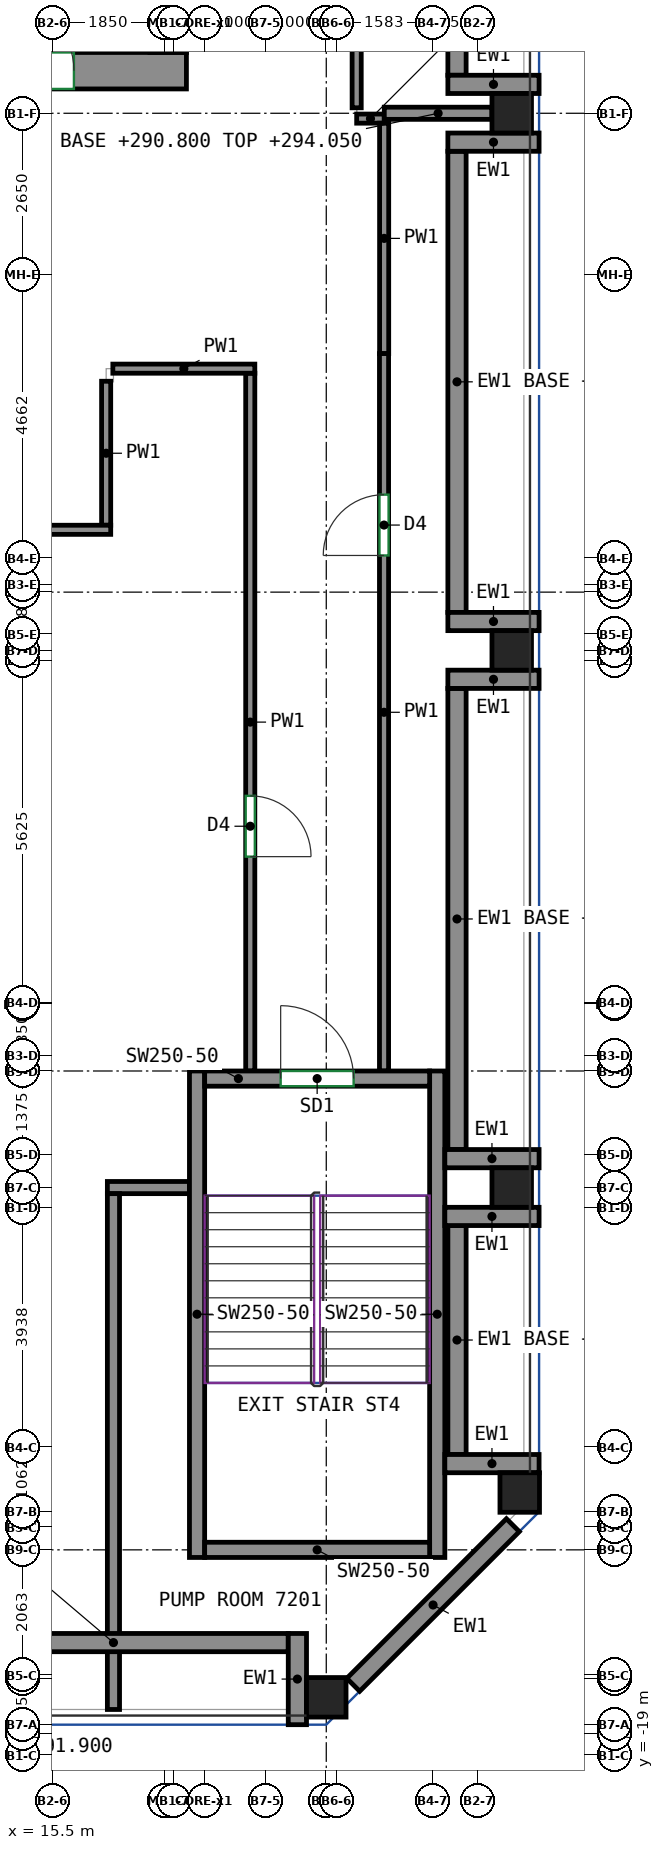
"""IFC4 building model, lengths in metres.
Left out: names, types, materials, properties, quantities, classifications, styles, units other than length and angle.
Written with IfcOpenShell. Run it as: python <this file> out.ifc"""

import sys

from ifc_helpers import new_model, si_unit, direction, frame, frame_2d, origin, origin_2d, place, context, subcontext, project, spatial, rectangle, extrude, source, transform, mapped, element, fill, save


model = new_model("IFC4")
c1 = context("Model", 3, precision=1e-05, world=origin(), true_north=direction((0.0, 1.0)))
c2 = subcontext(c1, "Body", "Model", "MODEL_VIEW")
j1 = project(units=[si_unit("LENGTHUNIT", "METRE"), si_unit("PLANEANGLEUNIT", "RADIAN")], contexts=[c1])
p1 = place(None, origin())
s1 = spatial("IfcSite", under=j1, at=p1, CompositionType="ELEMENT")
p2 = place(p1, origin())
s2 = spatial("IfcBuilding", under=s1, at=p2, CompositionType="ELEMENT")
p3 = place(p2, frame((0.0, 0.0, 290.8)))
s3 = spatial("IfcBuildingStorey", under=s2, at=p3, CompositionType="ELEMENT", Elevation=290.8)
m1 = source(origin(), c2, "Body", "SweptSolid", [
    extrude(rectangle(XDim=0.65, YDim=0.65, at=origin_2d()), origin(), (0.0, 0.0, 1.0), 2.3),
])
for number, where, z_axis, x_axis in (
    (1, (20.0, -18.05, 0.0), (0.0, 0.0, 1.0), (1.0, 0.0, 0.0)),
    (2, (23.05, -9.667, 0.0), (0.0, 0.0, 1.0), (1.0, 0.0, 0.0)),
    (3, (23.05, -0.833, 0.0), (0.0, 0.0, 1.0), (1.0, 0.0, 0.0)),
    (4, (23.05, 8.0, 0.0), (0.0, 0.0, 1.0), (1.0, 0.0, 0.0)),
    (5, (23.182, -14.682, 0.0), (0.0, 0.0, 1.0), (1.0, 0.0, 0.0)),
):
    element("IfcColumn", number, at=place(p3, frame(where, z_axis=z_axis, x_axis=x_axis)), inside=s3, PredefinedType="COLUMN", context=c2, shape_type="MappedRepresentation", body=[
        mapped(m1, transform((0.0, 0.0, 0.0))),
    ])
m2 = source(origin(), c2, "Body", "SweptSolid", [
    extrude(rectangle(XDim=5.23, YDim=0.6, at=frame_2d((2.615, 0.0))), origin(), (0.0, 0.0, 1.0), 3.8),
])
p4 = place(p3, frame((12.47, 8.7, 0.0), z_axis=(0.0, 0.0, 1.0), x_axis=(1.0, 0.0, 0.0)))
e6 = element("IfcWall", 6, at=p4, inside=s3, PredefinedType="SHEAR", context=c2, shape_type="MappedRepresentation", body=[
    mapped(m2, transform((0.0, 0.0, 0.0))),
])
p5 = place(p4, frame((2.18, 0.0, 0.0)))
e7 = element("IfcOpeningElement", 7, at=p5, cuts=e6, PredefinedType="OPENING", context=c2, shape_type="SweptSolid", body=[
    extrude(rectangle(XDim=1.2, YDim=2.1, at=frame_2d((0.6, 1.05))), frame((0.0, 0.31, 0.0), z_axis=(0.0, -1.0, 0.0), x_axis=(1.0, 0.0, 0.0)), (0.0, 0.0, 1.0), 0.62),
])
m3 = source(origin(), c2, "Body", "SweptSolid", [
    extrude(rectangle(XDim=8.0, YDim=0.25, at=frame_2d((4.0, 0.0))), origin(), (0.0, 0.0, 1.0), 3.8),
])
for number, where, z_axis, x_axis in (
    (8, (17.875, -15.75, 0.0), (0.0, 0.0, 1.0), (0.0, 1.0, 0.0)),
    (9, (21.825, -15.75, 0.0), (0.0, 0.0, 1.0), (0.0, 1.0, 0.0)),
):
    element("IfcWall", number, at=place(p3, frame(where, z_axis=z_axis, x_axis=x_axis)), inside=s3, PredefinedType="SHEAR", context=c2, shape_type="MappedRepresentation", body=[
        mapped(m3, transform((0.0, 0.0, 0.0))),
    ])
m4 = source(origin(), c2, "Body", "SweptSolid", [
    extrude(rectangle(XDim=3.7, YDim=0.25, at=frame_2d((1.85, 0.0))), origin(), (0.0, 0.0, 1.0), 3.8),
])
p6 = place(p3, frame((18.0, -15.625, 0.0), z_axis=(0.0, 0.0, 1.0), x_axis=(1.0, 0.0, 0.0)))
e10 = element("IfcWall", 10, at=p6, inside=s3, PredefinedType="SHEAR", context=c2, shape_type="MappedRepresentation", body=[
    mapped(m4, transform((0.0, 0.0, 0.0))),
])
p7 = place(p3, frame((18.0, -7.875, 0.0), z_axis=(0.0, 0.0, 1.0), x_axis=(1.0, 0.0, 0.0)))
e11 = element("IfcWall", 11, at=p7, inside=s3, PredefinedType="SHEAR", context=c2, shape_type="MappedRepresentation", body=[
    mapped(m4, transform((0.0, 0.0, 0.0))),
])
p8 = place(p7, frame((1.25, 0.0, 0.0)))
e12 = element("IfcOpeningElement", 12, at=p8, cuts=e11, PredefinedType="OPENING", context=c2, shape_type="SweptSolid", body=[
    extrude(rectangle(XDim=1.2, YDim=2.1, at=frame_2d((0.6, 1.05))), frame((0.0, 0.135, 0.0), z_axis=(0.0, -1.0, 0.0), x_axis=(1.0, 0.0, 0.0)), (0.0, 0.0, 1.0), 0.27),
])
m5 = source(origin(), c2, "Body", "SweptSolid", [
    extrude(rectangle(XDim=5.75, YDim=0.3, at=frame_2d((2.875, 0.0))), origin(), (0.0, 0.0, 1.0), 1.1),
])
p9 = place(p3, frame((13.625, -17.15, 0.0), z_axis=(0.0, 0.0, 1.0), x_axis=(1.0, 0.0, 0.0)))
e13 = element("IfcWall", 13, at=p9, inside=s3, PredefinedType="SOLIDWALL", context=c2, shape_type="MappedRepresentation", body=[
    mapped(m5, transform((0.0, 0.0, 0.0))),
])
m6 = source(origin(), c2, "Body", "SweptSolid", [
    extrude(rectangle(XDim=1.5, YDim=0.3, at=frame_2d((0.75, 0.0))), origin(), (0.0, 0.0, 1.0), 2.3),
])
p10 = place(p3, frame((19.525, -18.5, 0.0), z_axis=(0.0, 0.0, 1.0), x_axis=(0.0, 1.0, 0.0)))
e14 = element("IfcWall", 14, at=p10, inside=s3, PredefinedType="SOLIDWALL", context=c2, shape_type="MappedRepresentation", body=[
    mapped(m6, transform((0.0, 0.0, 0.0))),
])
m7 = source(origin(), c2, "Body", "SweptSolid", [
    extrude(rectangle(XDim=3.712, YDim=0.3, at=frame_2d((1.856, 0.0))), origin(), (0.0, 0.0, 1.0), 2.3),
])
p11 = place(p3, frame((20.444, -17.844, 0.0), z_axis=(0.0, 0.0, 1.0), x_axis=(0.707106781187, 0.707106781187, 0.0)))
e15 = element("IfcWall", 15, at=p11, inside=s3, PredefinedType="SOLIDWALL", context=c2, shape_type="MappedRepresentation", body=[
    mapped(m7, transform((0.0, 0.0, 0.0))),
])
m8 = source(origin(), c2, "Body", "SweptSolid", [
    extrude(rectangle(XDim=3.765, YDim=0.3, at=frame_2d((1.883, 0.0))), origin(), (0.0, 0.0, 1.0), 1.1),
])
p12 = place(p3, frame((22.15, -14.057, 0.0), z_axis=(0.0, 0.0, 1.0), x_axis=(0.0, 1.0, 0.0)))
e16 = element("IfcWall", 16, at=p12, inside=s3, PredefinedType="SOLIDWALL", context=c2, shape_type="MappedRepresentation", body=[
    mapped(m8, transform((0.0, 0.0, 0.0))),
])
m9 = source(origin(), c2, "Body", "SweptSolid", [
    extrude(rectangle(XDim=1.55, YDim=0.3, at=frame_2d((0.775, 0.0))), origin(), (0.0, 0.0, 1.0), 2.3),
])
for number, where, z_axis, x_axis in (
    (17, (23.5, -14.207, 0.0), (0.0, 0.0, 1.0), (-1.0, 0.0, 0.0)),
    (18, (23.5, -10.142, 0.0), (0.0, 0.0, 1.0), (-1.0, 0.0, 0.0)),
):
    element("IfcWall", number, at=place(p3, frame(where, z_axis=z_axis, x_axis=x_axis)), inside=s3, PredefinedType="SOLIDWALL", context=c2, shape_type="MappedRepresentation", body=[
        mapped(m9, transform((0.0, 0.0, 0.0))),
    ])
m10 = source(origin(), c2, "Body", "SweptSolid", [
    extrude(rectangle(XDim=7.583, YDim=0.3, at=frame_2d((3.792, 0.0))), origin(), (0.0, 0.0, 1.0), 1.1),
])
p13 = place(p3, frame((22.15, -9.042, 0.0), z_axis=(0.0, 0.0, 1.0), x_axis=(0.0, 1.0, 0.0)))
e19 = element("IfcWall", 19, at=p13, inside=s3, PredefinedType="SOLIDWALL", context=c2, shape_type="MappedRepresentation", body=[
    mapped(m10, transform((0.0, 0.0, 0.0))),
])
p14 = place(p3, frame((23.5, -9.192, 0.0), z_axis=(0.0, 0.0, 1.0), x_axis=(-1.0, 0.0, 0.0)))
e20 = element("IfcWall", 20, at=p14, inside=s3, PredefinedType="SOLIDWALL", context=c2, shape_type="MappedRepresentation", body=[
    mapped(m9, transform((0.0, 0.0, 0.0))),
])
p15 = place(p3, frame((23.5, -1.308, 0.0), z_axis=(0.0, 0.0, 1.0), x_axis=(-1.0, 0.0, 0.0)))
e21 = element("IfcWall", 21, at=p15, inside=s3, PredefinedType="SOLIDWALL", context=c2, shape_type="MappedRepresentation", body=[
    mapped(m6, transform((0.0, 0.0, 0.0))),
])
m11 = source(origin(), c2, "Body", "SweptSolid", [
    extrude(rectangle(XDim=7.583, YDim=0.3, at=frame_2d((3.792, 0.0))), origin(), (0.0, 0.0, 1.0), 1.1),
])
p16 = place(p3, frame((22.15, -0.208, 0.0), z_axis=(0.0, 0.0, 1.0), x_axis=(0.0, 1.0, 0.0)))
e22 = element("IfcWall", 22, at=p16, inside=s3, PredefinedType="SOLIDWALL", context=c2, shape_type="MappedRepresentation", body=[
    mapped(m11, transform((0.0, 0.0, 0.0))),
])
for number, where, z_axis, x_axis in (
    (23, (23.5, -0.358, 0.0), (0.0, 0.0, 1.0), (-1.0, 0.0, 0.0)),
    (24, (23.5, 7.525, 0.0), (0.0, 0.0, 1.0), (-1.0, 0.0, 0.0)),
):
    element("IfcWall", number, at=place(p3, frame(where, z_axis=z_axis, x_axis=x_axis)), inside=s3, PredefinedType="SOLIDWALL", context=c2, shape_type="MappedRepresentation", body=[
        mapped(m6, transform((0.0, 0.0, 0.0))),
    ])
m12 = source(origin(), c2, "Body", "SweptSolid", [
    extrude(rectangle(XDim=12.75, YDim=0.3, at=frame_2d((6.375, 0.0))), origin(), (0.0, 0.0, 1.0), 1.1),
])
p17 = place(p3, frame((22.15, 8.625, 0.0), z_axis=(0.0, 0.0, 1.0), x_axis=(0.0, 1.0, 0.0)))
e25 = element("IfcWall", 25, at=p17, inside=s3, PredefinedType="SOLIDWALL", context=c2, shape_type="MappedRepresentation", body=[
    mapped(m12, transform((0.0, 0.0, 0.0))),
])
p18 = place(p3, frame((23.5, 8.475, 0.0), z_axis=(0.0, 0.0, 1.0), x_axis=(-1.0, 0.0, 0.0)))
e26 = element("IfcWall", 26, at=p18, inside=s3, PredefinedType="SOLIDWALL", context=c2, shape_type="MappedRepresentation", body=[
    mapped(m6, transform((0.0, 0.0, 0.0))),
])
p19 = place(p3, frame((18.75, 3.725, 0.0), z_axis=(0.0, 0.0, 1.0), x_axis=(0.0, -1.0, 0.0)))
e27 = element("IfcWall", 27, at=p19, inside=s3, PredefinedType="PARTITIONING", context=c2, shape_type="SweptSolid", body=[
    extrude(rectangle(XDim=11.475, YDim=0.15, at=frame_2d((5.738, 0.0))), origin(), (0.0, 0.0, 1.0), 3.8),
])
p20 = place(p19, frame((6.95, 0.0, 0.0)))
e28 = element("IfcOpeningElement", 28, at=p20, cuts=e27, PredefinedType="OPENING", context=c2, shape_type="SweptSolid", body=[
    extrude(rectangle(XDim=1.0, YDim=2.1, at=frame_2d((0.5, 1.05))), frame((0.0, 0.085, 0.0), z_axis=(0.0, -1.0, 0.0), x_axis=(1.0, 0.0, 0.0)), (0.0, 0.0, 1.0), 0.17),
])
p21 = place(p3, frame((16.49, 3.8, 0.0), z_axis=(0.0, 0.0, 1.0), x_axis=(1.0, 0.0, 0.0)))
e29 = element("IfcWall", 29, at=p21, inside=s3, PredefinedType="PARTITIONING", context=c2, shape_type="SweptSolid", body=[
    extrude(rectangle(XDim=2.335, YDim=0.15, at=frame_2d((1.167, 0.0))), origin(), (0.0, 0.0, 1.0), 3.8),
])
p22 = place(p3, frame((16.38, 1.225, 0.0), z_axis=(0.0, 0.0, 1.0), x_axis=(0.0, 1.0, 0.0)))
e30 = element("IfcWall", 30, at=p22, inside=s3, PredefinedType="PARTITIONING", context=c2, shape_type="SweptSolid", body=[
    extrude(rectangle(XDim=2.368, YDim=0.15, at=frame_2d((1.184, 0.0))), origin(), (0.0, 0.0, 1.0), 3.8),
])
p23 = place(p3, frame((8.405, 1.15, 0.0), z_axis=(0.0, 0.0, 1.0), x_axis=(1.0, 0.0, 0.0)))
e31 = element("IfcWall", 31, at=p23, inside=s3, PredefinedType="PARTITIONING", context=c2, shape_type="SweptSolid", body=[
    extrude(rectangle(XDim=8.05, YDim=0.15, at=frame_2d((4.025, 0.0))), origin(), (0.0, 0.0, 1.0), 3.8),
])
p24 = place(p3, frame((20.954, 7.912, 0.0), z_axis=(0.0, 0.0, 1.0), x_axis=(-1.0, 0.0, 0.0)))
e32 = element("IfcWall", 32, at=p24, inside=s3, PredefinedType="PARTITIONING", context=c2, shape_type="SweptSolid", body=[
    extrude(rectangle(XDim=0.454, YDim=0.15, at=frame_2d((0.227, 0.0))), origin(), (0.0, 0.0, 1.0), 3.25),
])
p25 = place(p3, frame((20.952, 4.048, 0.0), z_axis=(0.0, 0.0, 1.0), x_axis=(0.0, 1.0, 0.0)))
e33 = element("IfcWall", 33, at=p25, inside=s3, PredefinedType="PARTITIONING", context=c2, shape_type="SweptSolid", body=[
    extrude(rectangle(XDim=3.789, YDim=0.15, at=frame_2d((1.895, 0.0))), origin(), (0.0, 0.0, 1.0), 3.8),
])
p26 = place(p3, frame((20.95, -7.75, 0.0), z_axis=(0.0, 0.0, 1.0), x_axis=(0.0, 1.0, 0.0)))
e34 = element("IfcWall", 34, at=p26, inside=s3, PredefinedType="PARTITIONING", context=c2, shape_type="SweptSolid", body=[
    extrude(rectangle(XDim=11.798, YDim=0.15, at=frame_2d((5.899, 0.0))), origin(), (0.0, 0.0, 1.0), 3.8),
])
p27 = place(p26, frame((8.478, 0.0, 0.0)))
e35 = element("IfcOpeningElement", 35, at=p27, cuts=e34, PredefinedType="OPENING", context=c2, shape_type="SweptSolid", body=[
    extrude(rectangle(XDim=1.0, YDim=2.1, at=frame_2d((0.5, 1.05))), frame((0.0, 0.085, 0.0), z_axis=(0.0, -1.0, 0.0), x_axis=(1.0, 0.0, 0.0)), (0.0, 0.0, 1.0), 0.17),
])
p28 = place(p3, frame((20.5, 8.09, 0.0), z_axis=(0.0, 0.0, 1.0), x_axis=(0.0, 1.0, 0.0)))
e36 = element("IfcWall", 36, at=p28, inside=s3, PredefinedType="PARTITIONING", context=c2, shape_type="SweptSolid", body=[
    extrude(rectangle(XDim=15.835, YDim=0.15, at=frame_2d((7.917, 0.0))), origin(), (0.0, 0.0, 1.0), 3.8),
])
p29 = place(p28, frame((12.831, 0.0, 0.0)))
e37 = element("IfcOpeningElement", 37, at=p29, cuts=e36, PredefinedType="OPENING", context=c2, shape_type="SweptSolid", body=[
    extrude(rectangle(XDim=1.0, YDim=2.1, at=frame_2d((0.5, 1.05))), frame((0.0, 0.085, 0.0), z_axis=(0.0, -1.0, 0.0), x_axis=(1.0, 0.0, 0.0)), (0.0, 0.0, 1.0), 0.17),
])
p30 = place(p3, frame((16.4, -9.667, 0.0), z_axis=(0.0, 0.0, 1.0), x_axis=(1.0, 0.0, 0.0)))
e38 = element("IfcWall", 38, at=p30, inside=s3, PredefinedType="PARTITIONING", context=c2, shape_type="SweptSolid", body=[
    extrude(rectangle(XDim=1.35, YDim=0.2, at=frame_2d((0.675, 0.0))), origin(), (0.0, 0.0, 1.0), 3.8),
])
p31 = place(p3, frame((16.5, -18.25, 0.0), z_axis=(0.0, 0.0, 1.0), x_axis=(0.0, 1.0, 0.0)))
e39 = element("IfcWall", 39, at=p31, inside=s3, PredefinedType="PARTITIONING", context=c2, shape_type="SweptSolid", body=[
    extrude(rectangle(XDim=0.98, YDim=0.2, at=frame_2d((0.49, 0.0))), origin(), (0.0, 0.0, 1.0), 3.8),
])
p32 = place(p3, frame((16.5, -17.03, 0.0), z_axis=(0.0, 0.0, 1.0), x_axis=(0.0, 1.0, 0.0)))
e40 = element("IfcWall", 40, at=p32, inside=s3, PredefinedType="PARTITIONING", context=c2, shape_type="SweptSolid", body=[
    extrude(rectangle(XDim=7.263, YDim=0.2, at=frame_2d((3.631, 0.0))), origin(), (0.0, 0.0, 1.0), 3.8),
])
p33 = place(p3, frame((22.725, 8.0, 0.0), z_axis=(0.0, 0.0, 1.0), x_axis=(-1.0, 0.0, 0.0)))
e41 = element("IfcWall", 41, at=p33, inside=s3, PredefinedType="PARTITIONING", context=c2, shape_type="SweptSolid", body=[
    extrude(rectangle(XDim=1.771, YDim=0.2, at=frame_2d((0.885, 0.0))), origin(), (0.0, 0.0, 1.0), 3.25),
])
p34 = place(p5, origin())
e42 = element("IfcDoor", 42, at=p34, inside=s3, OperationType="DOUBLE_DOOR_SINGLE_SWING", PredefinedType="DOOR", context=c2, shape_type="SweptSolid", body=[
    extrude(rectangle(XDim=1.2, YDim=2.1, at=frame_2d((0.6, 1.05))), frame((0.0, 0.205, 0.0), z_axis=(0.0, -1.0, 0.0), x_axis=(1.0, 0.0, 0.0)), (0.0, 0.0, 1.0), 0.05),
])
fill(e7, e42)
p35 = place(p8, origin())
e43 = element("IfcDoor", 43, at=p35, inside=s3, OperationType="DOUBLE_DOOR_SINGLE_SWING", PredefinedType="DOOR", context=c2, shape_type="SweptSolid", body=[
    extrude(rectangle(XDim=1.2, YDim=2.1, at=frame_2d((0.6, 1.05))), frame((0.0, 0.025, 0.0), z_axis=(0.0, -1.0, 0.0), x_axis=(1.0, 0.0, 0.0)), (0.0, 0.0, 1.0), 0.05),
])
fill(e12, e43)
p36 = place(p20, origin())
e44 = element("IfcDoor", 44, at=p36, inside=s3, OperationType="SINGLE_SWING_RIGHT", PredefinedType="DOOR", context=c2, shape_type="SweptSolid", body=[
    extrude(rectangle(XDim=1.0, YDim=2.1, at=frame_2d((0.5, 1.05))), frame((0.0, 0.025, 0.0), z_axis=(0.0, -1.0, 0.0), x_axis=(1.0, 0.0, 0.0)), (0.0, 0.0, 1.0), 0.05),
])
fill(e28, e44)
p37 = place(p27, origin())
e45 = element("IfcDoor", 45, at=p37, inside=s3, OperationType="SINGLE_SWING_LEFT", PredefinedType="DOOR", context=c2, shape_type="SweptSolid", body=[
    extrude(rectangle(XDim=1.0, YDim=2.1, at=frame_2d((0.5, 1.05))), frame((0.0, 0.025, 0.0), z_axis=(0.0, -1.0, 0.0), x_axis=(1.0, 0.0, 0.0)), (0.0, 0.0, 1.0), 0.05),
])
fill(e35, e45)
save(model, sys.argv[1])
